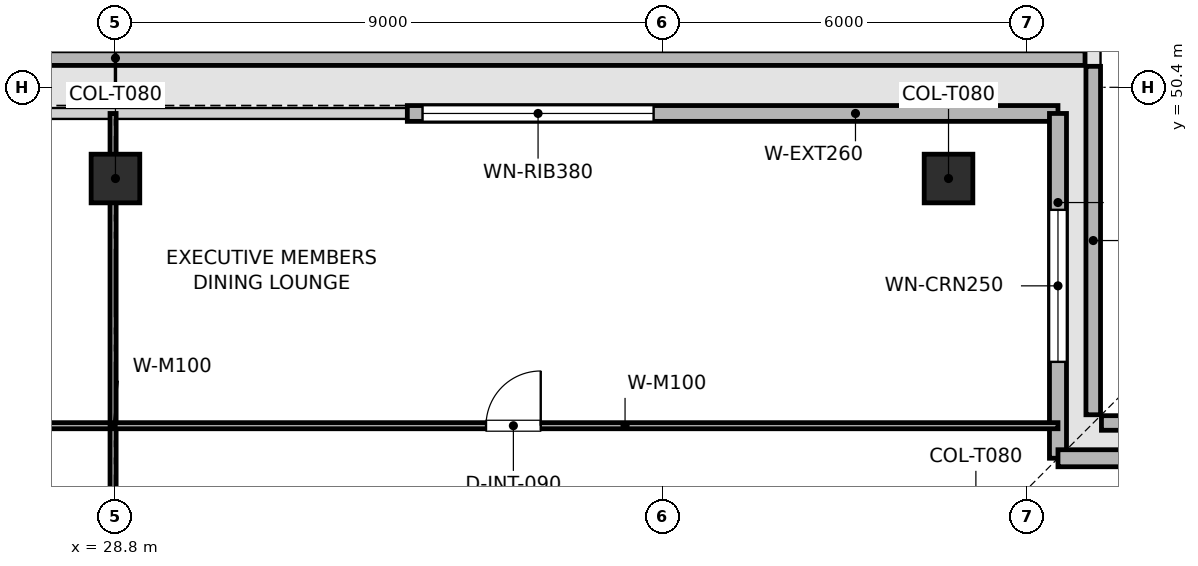
"""IFC4 building model, lengths in metres.
Left out: names, types, materials, properties, quantities, classifications, styles, units other than length and angle.
Written with IfcOpenShell. Run it as: python <this file> out.ifc"""

import sys

from ifc_helpers import new_model, si_unit, direction, frame, frame_2d, origin, origin_2d, place, context, subcontext, project, spatial, rectangle, extrude, element, fill, save


model = new_model("IFC4")
c1 = context("Model", 3, precision=1e-05, world=origin(), true_north=direction((0.0, 1.0)))
c2 = subcontext(c1, "Body", "Model", "MODEL_VIEW")
j1 = project(units=[si_unit("LENGTHUNIT", "METRE"), si_unit("PLANEANGLEUNIT", "RADIAN")], contexts=[c1])
p1 = place(None, origin())
s1 = spatial("IfcSite", under=j1, at=p1, CompositionType="ELEMENT")
p2 = place(p1, origin())
s2 = spatial("IfcBuilding", under=s1, at=p2, CompositionType="ELEMENT")
p3 = place(p2, frame((0.0, 0.0, 344.25)))
s3 = spatial("IfcBuildingStorey", under=s2, at=p3, CompositionType="ELEMENT", Elevation=344.25)
for number, where, z_axis, x_axis in (
    (1, (42.5, 48.9, 0.003), (0.0, 0.0, 1.0), (1.0, 0.0, 0.0)),
    (2, (28.8, 48.9, 0.003), (0.0, 0.0, 1.0), (1.0, 0.0, 0.0)),
):
    element("IfcColumn", number, at=place(p3, frame(where, z_axis=z_axis, x_axis=x_axis)), inside=s3, PredefinedType="COLUMN", context=c2, shape_type="SweptSolid", body=[
        extrude(rectangle(XDim=0.8, YDim=0.8, at=origin_2d()), origin(), (0.0, 0.0, 1.0), 3.504),
    ])
for number, where, z_axis, x_axis in (
    (3, (50.745, 44.88, 0.0), (0.0, 0.0, 1.0), (-1.0, 0.0, 0.0)),
    (4, (44.88, 45.015, 0.0), (0.0, 0.0, 1.0), (0.0, 1.0, 0.0)),
):
    element("IfcWall", number, at=place(p3, frame(where, z_axis=z_axis, x_axis=x_axis)), inside=s3, PredefinedType="PARAPET", context=c2, shape_type="SweptSolid", body=[
        extrude(rectangle(XDim=5.73, YDim=0.24, at=frame_2d((2.865, 0.0))), origin(), (0.0, 0.0, 1.0), 1.2),
    ])
p4 = place(p3, frame((44.745, 50.88, 0.0), z_axis=(0.0, 0.0, 1.0), x_axis=(-1.0, 0.0, 0.0)))
e5 = element("IfcWall", 5, at=p4, inside=s3, PredefinedType="PARAPET", context=c2, shape_type="SweptSolid", body=[
    extrude(rectangle(XDim=31.89, YDim=0.24, at=frame_2d((15.945, 0.0))), origin(), (0.0, 0.0, 1.0), 1.2),
])
p5 = place(p3, frame((33.6, 49.97, 0.0), z_axis=(0.0, 0.0, 1.0), x_axis=(1.0, 0.0, 0.0)))
e6 = element("IfcWall", 6, at=p5, inside=s3, PredefinedType="SOLIDWALL", context=c2, shape_type="SweptSolid", body=[
    extrude(rectangle(XDim=10.7, YDim=0.26, at=frame_2d((5.35, 0.0))), origin(), (0.0, 0.0, 1.0), 3.51),
])
p6 = place(p5, frame((0.25, 0.0, 0.9)))
e7 = element("IfcOpeningElement", 7, at=p6, cuts=e6, PredefinedType="OPENING", context=c2, shape_type="SweptSolid", body=[
    extrude(rectangle(XDim=3.8, YDim=1.9, at=frame_2d((1.9, 0.95))), frame((0.0, 0.14, 0.0), z_axis=(0.0, -1.0, 0.0), x_axis=(1.0, 0.0, 0.0)), (0.0, 0.0, 1.0), 0.28),
])
p7 = place(p3, frame((44.3, 49.97, 0.0), z_axis=(0.0, 0.0, 1.0), x_axis=(0.0, -1.0, 0.0)))
e8 = element("IfcWall", 8, at=p7, inside=s3, PredefinedType="SOLIDWALL", context=c2, shape_type="SweptSolid", body=[
    extrude(rectangle(XDim=5.67, YDim=0.28, at=frame_2d((2.835, 0.0))), origin(), (0.0, 0.0, 1.0), 3.51),
])
p8 = place(p7, frame((1.585, 0.0, 0.9)))
e9 = element("IfcOpeningElement", 9, at=p8, cuts=e8, PredefinedType="OPENING", context=c2, shape_type="SweptSolid", body=[
    extrude(rectangle(XDim=2.5, YDim=1.9, at=frame_2d((1.25, 0.95))), frame((0.0, 0.15, 0.0), z_axis=(0.0, -1.0, 0.0), x_axis=(1.0, 0.0, 0.0)), (0.0, 0.0, 1.0), 0.3),
])
p9 = place(p3, frame((44.3, 44.3, 0.0), z_axis=(0.0, 0.0, 1.0), x_axis=(1.0, 0.0, 0.0)))
e10 = element("IfcWall", 10, at=p9, inside=s3, PredefinedType="SOLIDWALL", context=c2, shape_type="SweptSolid", body=[
    extrude(rectangle(XDim=5.67, YDim=0.28, at=frame_2d((2.835, 0.0))), origin(), (0.0, 0.0, 1.0), 3.51),
])
p10 = place(p9, frame((1.585, 0.0, 0.9)))
e11 = element("IfcOpeningElement", 11, at=p10, cuts=e10, PredefinedType="OPENING", context=c2, shape_type="SweptSolid", body=[
    extrude(rectangle(XDim=2.5, YDim=1.9, at=frame_2d((1.25, 0.95))), frame((0.0, 0.15, 0.0), z_axis=(0.0, -1.0, 0.0), x_axis=(1.0, 0.0, 0.0)), (0.0, 0.0, 1.0), 0.3),
])
p11 = place(p3, frame((20.33, 44.835, 0.0), z_axis=(0.0, 0.0, 1.0), x_axis=(1.0, 0.0, 0.0)))
e12 = element("IfcWall", 12, at=p11, inside=s3, PredefinedType="MOVABLE", context=c2, shape_type="SweptSolid", body=[
    extrude(rectangle(XDim=8.431, YDim=0.1, at=frame_2d((4.215, 0.0))), origin(), (0.0, 0.0, 1.0), 3.095),
])
p12 = place(p11, frame((1.389, 0.0, 0.0)))
e13 = element("IfcOpeningElement", 13, at=p12, cuts=e12, PredefinedType="OPENING", context=c2, shape_type="SweptSolid", body=[
    extrude(rectangle(XDim=0.9, YDim=2.1, at=frame_2d((0.45, 1.05))), frame((0.0, 0.06, 0.0), z_axis=(0.0, -1.0, 0.0), x_axis=(1.0, 0.0, 0.0)), (0.0, 0.0, 1.0), 0.12),
])
p13 = place(p3, frame((28.761, 39.7, 0.0), z_axis=(0.0, 0.0, 1.0), x_axis=(0.0, 1.0, 0.0)))
e14 = element("IfcWall", 14, at=p13, inside=s3, PredefinedType="MOVABLE", context=c2, shape_type="SweptSolid", body=[
    extrude(rectangle(XDim=10.27, YDim=0.1, at=frame_2d((5.135, 0.0))), origin(), (0.0, 0.0, 1.0), 2.995),
])
p14 = place(p3, frame((28.761, 44.835, 0.0), z_axis=(0.0, 0.0, 1.0), x_axis=(1.0, 0.0, 0.0)))
e15 = element("IfcWall", 15, at=p14, inside=s3, PredefinedType="MOVABLE", context=c2, shape_type="SweptSolid", body=[
    extrude(rectangle(XDim=15.539, YDim=0.1, at=frame_2d((7.77, 0.0))), origin(), (0.0, 0.0, 1.0), 3.095),
])
p15 = place(p14, frame((6.133, 0.0, 0.0)))
e16 = element("IfcOpeningElement", 16, at=p15, cuts=e15, PredefinedType="OPENING", context=c2, shape_type="SweptSolid", body=[
    extrude(rectangle(XDim=0.9, YDim=2.1, at=frame_2d((0.45, 1.05))), frame((0.0, 0.06, 0.0), z_axis=(0.0, -1.0, 0.0), x_axis=(1.0, 0.0, 0.0)), (0.0, 0.0, 1.0), 0.12),
])
p16 = place(p6, origin())
e17 = element("IfcWindow", 17, at=p16, inside=s3, PartitioningType="SINGLE_PANEL", PredefinedType="WINDOW", context=c2, shape_type="SweptSolid", body=[
    extrude(rectangle(XDim=3.8, YDim=1.9, at=frame_2d((1.9, 0.95))), frame((0.0, 0.03, 0.0), z_axis=(0.0, -1.0, 0.0), x_axis=(1.0, 0.0, 0.0)), (0.0, 0.0, 1.0), 0.06),
])
fill(e7, e17)
p17 = place(p8, origin())
e18 = element("IfcWindow", 18, at=p17, inside=s3, PartitioningType="SINGLE_PANEL", PredefinedType="WINDOW", context=c2, shape_type="SweptSolid", body=[
    extrude(rectangle(XDim=2.5, YDim=1.9, at=frame_2d((1.25, 0.95))), frame((0.0, 0.03, 0.0), z_axis=(0.0, -1.0, 0.0), x_axis=(1.0, 0.0, 0.0)), (0.0, 0.0, 1.0), 0.06),
])
fill(e9, e18)
p18 = place(p15, origin())
e19 = element("IfcDoor", 19, at=p18, inside=s3, OperationType="SINGLE_SWING_RIGHT", PredefinedType="DOOR", context=c2, shape_type="SweptSolid", body=[
    extrude(rectangle(XDim=0.9, YDim=2.1, at=frame_2d((0.45, 1.05))), frame((0.0, 0.025, 0.0), z_axis=(0.0, -1.0, 0.0), x_axis=(1.0, 0.0, 0.0)), (0.0, 0.0, 1.0), 0.05),
])
fill(e16, e19)
save(model, sys.argv[1])
